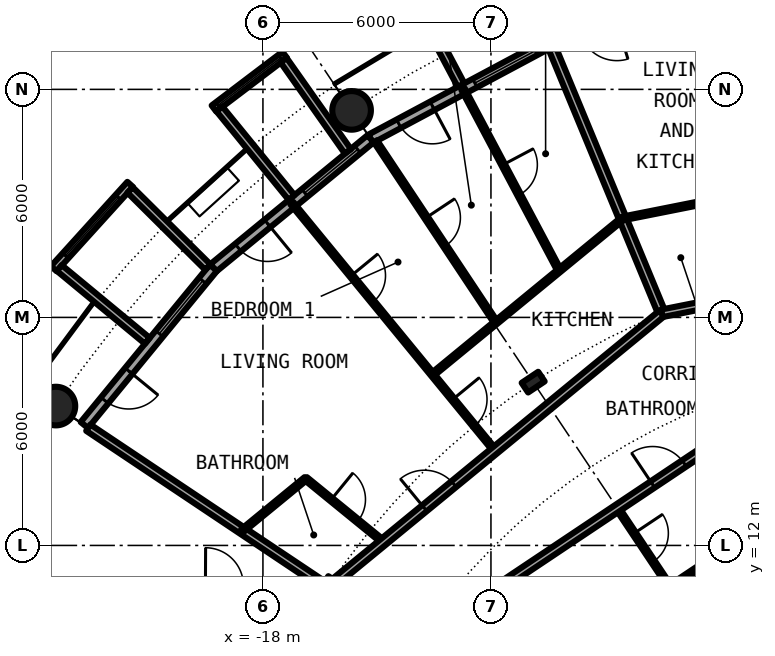
"""IFC4 building model, lengths in metres.
Left out: names, types, materials, properties, quantities, classifications, styles, units other than length and angle.
Written with IfcOpenShell. Run it as: python <this file> out.ifc"""

import sys

from ifc_helpers import new_model, si_unit, direction, frame, frame_2d, origin, origin_2d, place, context, subcontext, project, spatial, rectangle, circle, hollow_circle, i_section, extrude, element, fill, save


model = new_model("IFC4")
c1 = context("Model", 3, precision=1e-05, world=origin(), true_north=direction((0.0, 1.0)))
c2 = subcontext(c1, "Body", "Model", "MODEL_VIEW")
j1 = project(units=[si_unit("LENGTHUNIT", "METRE"), si_unit("PLANEANGLEUNIT", "RADIAN")], contexts=[c1])
p1 = place(None, origin())
s1 = spatial("IfcSite", under=j1, at=p1, CompositionType="ELEMENT")
p2 = place(p1, origin())
s2 = spatial("IfcBuilding", under=s1, at=p2, CompositionType="ELEMENT")
p3 = place(p2, frame((0.0, 0.0, 91.05)))
s3 = spatial("IfcBuildingStorey", under=s2, at=p3, CompositionType="ELEMENT", Elevation=91.05)
for number, where, z_axis, x_axis in (
    (1, (-15.667, 23.448, 0.0), (0.0, 0.0, 1.0), (1.0, 0.0, 0.0)),
    (2, (-23.448, 15.667, 0.0), (0.0, 0.0, 1.0), (1.0, 0.0, 0.0)),
):
    element("IfcColumn", number, at=place(p3, frame(where, z_axis=z_axis, x_axis=x_axis)), inside=s3, PredefinedType="COLUMN", context=c2, shape_type="SweptSolid", body=[
        extrude(hollow_circle(Radius=0.508, WallThickness=0.04, at=origin_2d()), origin(), (0.0, 0.0, 1.0), 3.05),
    ])
for number, where, z_axis, x_axis in (
    (3, (-10.889, 16.297, 0.0), (0.0, 0.0, 1.0), (-0.556, 0.831, 0.0)),
    (4, (-16.297, 10.889, 0.0), (0.0, 0.0, 1.0), (-0.831, 0.556, 0.0)),
):
    element("IfcColumn", number, at=place(p3, frame(where, z_axis=z_axis, x_axis=x_axis)), inside=s3, PredefinedType="COLUMN", context=c2, shape_type="SweptSolid", body=[
        extrude(i_section(OverallWidth=0.306, OverallDepth=0.524, WebThickness=0.021, FlangeThickness=0.04, FilletRadius=0.027, at=origin_2d()), origin(), (0.0, 0.0, 1.0), 3.05),
    ])
p4 = place(p3, frame((-10.447, 25.222, 0.0), z_axis=(0.0, 0.0, 1.0), x_axis=(-0.881915646801, -0.471407246368, 0.0)))
e5 = element("IfcWall", 5, at=p4, inside=s3, PredefinedType="SOLIDWALL", context=c2, shape_type="SweptSolid", body=[
    extrude(rectangle(XDim=5.352, YDim=0.25, at=frame_2d((2.676, 0.0))), origin(), (0.0, 0.0, 1.0), 2.7),
])
p5 = place(p4, frame((0.441, 0.0, 0.3)))
e6 = element("IfcOpeningElement", 6, at=p5, cuts=e5, PredefinedType="OPENING", context=c2, shape_type="SweptSolid", body=[
    extrude(rectangle(XDim=1.8, YDim=2.1, at=frame_2d((0.9, 1.05))), frame((0.0, 0.135, 0.0), z_axis=(0.0, -1.0, 0.0), x_axis=(1.0, 0.0, 0.0)), (0.0, 0.0, 1.0), 0.27),
])
p6 = place(p4, frame((3.51, 0.0, 0.0)))
e7 = element("IfcOpeningElement", 7, at=p6, cuts=e5, PredefinedType="OPENING", context=c2, shape_type="SweptSolid", body=[
    extrude(rectangle(XDim=1.0, YDim=2.2, at=frame_2d((0.5, 1.1))), frame((0.0, 0.135, 0.0), z_axis=(0.0, -1.0, 0.0), x_axis=(1.0, 0.0, 0.0)), (0.0, 0.0, 1.0), 0.27),
])
p7 = place(p3, frame((-12.787, 24.113, -0.03), z_axis=(0.0, 0.0, 1.0), x_axis=(-0.468365282436, 0.883534924159, 0.0)))
e8 = element("IfcWall", 8, at=p7, inside=s3, PredefinedType="SOLIDWALL", context=c2, shape_type="SweptSolid", body=[
    extrude(rectangle(XDim=3.006, YDim=0.2, at=frame_2d((1.503, 0.0))), origin(), (0.0, 0.0, 1.0), 2.73),
])
p8 = place(p3, frame((-15.167, 22.699, 0.0), z_axis=(0.0, 0.0, 1.0), x_axis=(-0.773019449054, -0.634382322723, 0.0)))
e9 = element("IfcWall", 9, at=p8, inside=s3, PredefinedType="SOLIDWALL", context=c2, shape_type="SweptSolid", body=[
    extrude(rectangle(XDim=5.352, YDim=0.25, at=frame_2d((2.676, 0.0))), origin(), (0.0, 0.0, 1.0), 2.7),
])
p9 = place(p8, frame((0.441, 0.0, 0.3)))
e10 = element("IfcOpeningElement", 10, at=p9, cuts=e9, PredefinedType="OPENING", context=c2, shape_type="SweptSolid", body=[
    extrude(rectangle(XDim=1.8, YDim=2.1, at=frame_2d((0.9, 1.05))), frame((0.0, 0.135, 0.0), z_axis=(0.0, -1.0, 0.0), x_axis=(1.0, 0.0, 0.0)), (0.0, 0.0, 1.0), 0.27),
])
p10 = place(p8, frame((3.51, 0.0, 0.0)))
e11 = element("IfcOpeningElement", 11, at=p10, cuts=e9, PredefinedType="OPENING", context=c2, shape_type="SweptSolid", body=[
    extrude(rectangle(XDim=1.0, YDim=2.2, at=frame_2d((0.5, 1.1))), frame((0.0, 0.135, 0.0), z_axis=(0.0, -1.0, 0.0), x_axis=(1.0, 0.0, 0.0)), (0.0, 0.0, 1.0), 0.27),
])
p11 = place(p3, frame((-17.427, 24.909, -0.03), z_axis=(0.0, 0.0, 1.0), x_axis=(-0.796842165306, -0.60418752353, 0.0)))
e12 = element("IfcWall", 12, at=p11, inside=s3, PredefinedType="SOLIDWALL", context=c2, shape_type="SweptSolid", body=[
    extrude(rectangle(XDim=2.337, YDim=0.2, at=frame_2d((1.168, 0.0))), origin(), (0.0, 0.0, 1.0), 2.73),
])
p12 = place(p11, frame((0.128, 0.0, 0.33)))
e13 = element("IfcOpeningElement", 13, at=p12, cuts=e12, PredefinedType="OPENING", context=c2, shape_type="SweptSolid", body=[
    extrude(circle(Radius=1.04, at=frame_2d((1.04, 1.04))), frame((0.0, 0.11, 0.0), z_axis=(0.0, -1.0, 0.0), x_axis=(1.0, 0.0, 0.0)), (0.0, 0.0, 1.0), 0.22),
])
p13 = place(p3, frame((-15.765, 22.37, -0.03), z_axis=(0.0, 0.0, 1.0), x_axis=(-0.576274612209, 0.817256123454, 0.0)))
e14 = element("IfcWall", 14, at=p13, inside=s3, PredefinedType="SOLIDWALL", context=c2, shape_type="SweptSolid", body=[
    extrude(rectangle(XDim=2.933, YDim=0.2, at=frame_2d((1.466, 0.0))), origin(), (0.0, 0.0, 1.0), 2.73),
])
p14 = place(p3, frame((-17.246, 21.155, -0.03), z_axis=(0.0, 0.0, 1.0), x_axis=(-0.631741648902, 0.775179004516, 0.0)))
e15 = element("IfcWall", 15, at=p14, inside=s3, PredefinedType="SOLIDWALL", context=c2, shape_type="SweptSolid", body=[
    extrude(rectangle(XDim=3.006, YDim=0.2, at=frame_2d((1.503, 0.0))), origin(), (0.0, 0.0, 1.0), 2.73),
])
p15 = place(p3, frame((-19.304, 19.304, 0.0), z_axis=(0.0, 0.0, 1.0), x_axis=(-0.634382322723, -0.773019449054, 0.0)))
e16 = element("IfcWall", 16, at=p15, inside=s3, PredefinedType="SOLIDWALL", context=c2, shape_type="SweptSolid", body=[
    extrude(rectangle(XDim=5.352, YDim=0.25, at=frame_2d((2.676, 0.0))), origin(), (0.0, 0.0, 1.0), 2.7),
])
p16 = place(p15, frame((0.441, 0.0, 0.3)))
e17 = element("IfcOpeningElement", 17, at=p16, cuts=e16, PredefinedType="OPENING", context=c2, shape_type="SweptSolid", body=[
    extrude(rectangle(XDim=1.8, YDim=2.1, at=frame_2d((0.9, 1.05))), frame((0.0, 0.135, 0.0), z_axis=(0.0, -1.0, 0.0), x_axis=(1.0, 0.0, 0.0)), (0.0, 0.0, 1.0), 0.27),
])
p17 = place(p15, frame((3.51, 0.0, 0.0)))
e18 = element("IfcOpeningElement", 18, at=p17, cuts=e16, PredefinedType="OPENING", context=c2, shape_type="SweptSolid", body=[
    extrude(rectangle(XDim=1.0, YDim=2.2, at=frame_2d((0.5, 1.1))), frame((0.0, 0.135, 0.0), z_axis=(0.0, -1.0, 0.0), x_axis=(1.0, 0.0, 0.0)), (0.0, 0.0, 1.0), 0.27),
])
p18 = place(p3, frame((-21.493, 21.5, -0.03), z_axis=(0.0, 0.0, 1.0), x_axis=(-0.671506829416, -0.740998365753, 0.0)))
e19 = element("IfcWall", 19, at=p18, inside=s3, PredefinedType="SOLIDWALL", context=c2, shape_type="SweptSolid", body=[
    extrude(rectangle(XDim=2.993, YDim=0.2, at=frame_2d((1.497, 0.0))), origin(), (0.0, 0.0, 1.0), 2.73),
])
p19 = place(p18, frame((0.457, 0.0, 0.33)))
e20 = element("IfcOpeningElement", 20, at=p19, cuts=e19, PredefinedType="OPENING", context=c2, shape_type="SweptSolid", body=[
    extrude(circle(Radius=1.04, at=frame_2d((1.04, 1.04))), frame((0.0, 0.11, 0.0), z_axis=(0.0, -1.0, 0.0), x_axis=(1.0, 0.0, 0.0)), (0.0, 0.0, 1.0), 0.22),
])
p20 = place(p3, frame((-19.45, 19.323, -0.03), z_axis=(0.0, 0.0, 1.0), x_axis=(-0.709727076896, 0.704476739375, 0.0)))
e21 = element("IfcWall", 21, at=p20, inside=s3, PredefinedType="SOLIDWALL", context=c2, shape_type="SweptSolid", body=[
    extrude(rectangle(XDim=2.883, YDim=0.2, at=frame_2d((1.441, 0.0))), origin(), (0.0, 0.0, 1.0), 2.73),
])
p21 = place(p3, frame((-21.041, 17.384, -0.03), z_axis=(0.0, 0.0, 1.0), x_axis=(-0.770784861449, 0.63709551667, 0.0)))
e22 = element("IfcWall", 22, at=p21, inside=s3, PredefinedType="SOLIDWALL", context=c2, shape_type="SweptSolid", body=[
    extrude(rectangle(XDim=3.006, YDim=0.2, at=frame_2d((1.503, 0.0))), origin(), (0.0, 0.0, 1.0), 2.73),
])
p22 = place(p3, frame((-22.595, 15.098, 0.0), z_axis=(0.0, 0.0, 1.0), x_axis=(0.831382022135, -0.555701298605, 0.0)))
e23 = element("IfcWall", 23, at=p22, inside=s3, PredefinedType="PARTITIONING", context=c2, shape_type="SweptSolid", body=[
    extrude(rectangle(XDim=7.313, YDim=0.2, at=frame_2d((3.657, 0.0))), origin(), (0.0, 0.0, 1.0), 2.7),
])
p23 = place(p3, frame((-17.24, 21.007, 0.0), z_axis=(0.0, 0.0, 1.0), x_axis=(0.634396151441, -0.77300810024, 0.0)))
e24 = element("IfcWall", 24, at=p23, inside=s3, PredefinedType="PARTITIONING", context=c2, shape_type="SweptSolid", body=[
    extrude(rectangle(XDim=8.419, YDim=0.1, at=frame_2d((4.209, 0.0))), origin(), (0.0, 0.0, 1.0), 2.7),
])
p24 = place(p23, frame((6.679, 0.0, 0.0)))
e25 = element("IfcOpeningElement", 25, at=p24, cuts=e24, PredefinedType="OPENING", context=c2, shape_type="SweptSolid", body=[
    extrude(rectangle(XDim=0.9, YDim=2.3, at=frame_2d((0.45, 1.15))), frame((0.0, 0.06, 0.0), z_axis=(0.0, -1.0, 0.0), x_axis=(1.0, 0.0, 0.0)), (0.0, 0.0, 1.0), 0.12),
])
p25 = place(p23, frame((2.468, 0.0, 0.0)))
e26 = element("IfcOpeningElement", 26, at=p25, cuts=e24, PredefinedType="OPENING", context=c2, shape_type="SweptSolid", body=[
    extrude(rectangle(XDim=0.9, YDim=2.3, at=frame_2d((0.45, 1.15))), frame((0.0, 0.06, 0.0), z_axis=(0.0, -1.0, 0.0), x_axis=(1.0, 0.0, 0.0)), (0.0, 0.0, 1.0), 0.12),
])
p26 = place(p3, frame((-16.874, 13.758, 0.0), z_axis=(0.0, 0.0, 1.0), x_axis=(0.774979608522, -0.631986239072, 0.0)))
e27 = element("IfcWall", 27, at=p26, inside=s3, PredefinedType="PARTITIONING", context=c2, shape_type="SweptSolid", body=[
    extrude(rectangle(XDim=2.636, YDim=0.1, at=frame_2d((1.318, 0.0))), origin(), (0.0, 0.0, 1.0), 2.7),
])
p27 = place(p26, frame((0.868, 0.0, 0.0)))
e28 = element("IfcOpeningElement", 28, at=p27, cuts=e27, PredefinedType="OPENING", context=c2, shape_type="SweptSolid", body=[
    extrude(rectangle(XDim=0.9, YDim=2.3, at=frame_2d((0.45, 1.15))), frame((0.0, 0.06, 0.0), z_axis=(0.0, -1.0, 0.0), x_axis=(1.0, 0.0, 0.0)), (0.0, 0.0, 1.0), 0.12),
])
p28 = place(p3, frame((-15.039, 22.634, 0.0), z_axis=(0.0, 0.0, 1.0), x_axis=(0.553440102418, -0.832888980018, 0.0)))
e29 = element("IfcWall", 29, at=p28, inside=s3, PredefinedType="PARTITIONING", context=c2, shape_type="SweptSolid", body=[
    extrude(rectangle(XDim=5.726, YDim=0.1, at=frame_2d((2.863, 0.0))), origin(), (0.0, 0.0, 1.0), 2.7),
])
p29 = place(p28, frame((2.413, 0.0, 0.0)))
e30 = element("IfcOpeningElement", 30, at=p29, cuts=e29, PredefinedType="OPENING", context=c2, shape_type="SweptSolid", body=[
    extrude(rectangle(XDim=0.9, YDim=2.3, at=frame_2d((0.45, 1.15))), frame((0.0, 0.06, 0.0), z_axis=(0.0, -1.0, 0.0), x_axis=(1.0, 0.0, 0.0)), (0.0, 0.0, 1.0), 0.12),
])
p30 = place(p3, frame((-12.734, 24.007, 0.0), z_axis=(0.0, 0.0, 1.0), x_axis=(0.468610030042, -0.883405139075, 0.0)))
e31 = element("IfcWall", 31, at=p30, inside=s3, PredefinedType="PARTITIONING", context=c2, shape_type="SweptSolid", body=[
    extrude(rectangle(XDim=5.403, YDim=0.1, at=frame_2d((2.702, 0.0))), origin(), (0.0, 0.0, 1.0), 2.7),
])
p31 = place(p30, frame((2.252, 0.0, 0.0)))
e32 = element("IfcOpeningElement", 32, at=p31, cuts=e31, PredefinedType="OPENING", context=c2, shape_type="SweptSolid", body=[
    extrude(rectangle(XDim=0.9, YDim=2.3, at=frame_2d((0.45, 1.15))), frame((0.0, 0.06, 0.0), z_axis=(0.0, -1.0, 0.0), x_axis=(1.0, 0.0, 0.0)), (0.0, 0.0, 1.0), 0.12),
])
p32 = place(p3, frame((-10.398, 25.106, 0.0), z_axis=(0.0, 0.0, 1.0), x_axis=(0.382490346157, -0.923959487801, 0.0)))
e33 = element("IfcWall", 33, at=p32, inside=s3, PredefinedType="PARTITIONING", context=c2, shape_type="SweptSolid", body=[
    extrude(rectangle(XDim=7.574, YDim=0.2, at=frame_2d((3.787, 0.0))), origin(), (0.0, 0.0, 1.0), 2.7),
])
p33 = place(p3, frame((-8.674, 12.982, 0.0), z_axis=(0.0, 0.0, 1.0), x_axis=(0.555355163998, -0.831613276602, 0.0)))
e34 = element("IfcWall", 34, at=p33, inside=s3, PredefinedType="PARTITIONING", context=c2, shape_type="SweptSolid", body=[
    extrude(rectangle(XDim=2.494, YDim=0.1, at=frame_2d((1.247, 0.0))), origin(), (0.0, 0.0, 1.0), 2.7),
])
p34 = place(p33, frame((0.797, 0.0, 0.0)))
e35 = element("IfcOpeningElement", 35, at=p34, cuts=e34, PredefinedType="OPENING", context=c2, shape_type="SweptSolid", body=[
    extrude(rectangle(XDim=0.9, YDim=2.3, at=frame_2d((0.45, 1.15))), frame((0.0, 0.06, 0.0), z_axis=(0.0, -1.0, 0.0), x_axis=(1.0, 0.0, 0.0)), (0.0, 0.0, 1.0), 0.12),
])
p35 = place(p3, frame((-9.695, 9.3, 0.0), z_axis=(0.0, 0.0, 1.0), x_axis=(0.831369521678, 0.555720000022, 0.0)))
e36 = element("IfcWall", 36, at=p35, inside=s3, PredefinedType="PARTITIONING", context=c2, shape_type="SweptSolid", body=[
    extrude(rectangle(XDim=4.252, YDim=0.1, at=frame_2d((2.126, 0.0))), origin(), (0.0, 0.0, 1.0), 2.7),
])
p36 = place(p3, frame((-12.708, 10.286, 0.0), z_axis=(0.0, 0.0, 1.0), x_axis=(0.831405725802, 0.555665834026, 0.0)))
e37 = element("IfcWall", 37, at=p36, inside=s3, PredefinedType="PARTITIONING", context=c2, shape_type="SweptSolid", body=[
    extrude(rectangle(XDim=11.314, YDim=0.2, at=frame_2d((5.657, 0.0))), origin(), (0.0, 0.0, 1.0), 2.7),
])
p37 = place(p36, frame((5.969, 0.0, 0.0)))
e38 = element("IfcOpeningElement", 38, at=p37, cuts=e37, PredefinedType="OPENING", context=c2, shape_type="SweptSolid", body=[
    extrude(rectangle(XDim=1.0, YDim=2.3, at=frame_2d((0.5, 1.15))), frame((0.0, 0.11, 0.0), z_axis=(0.0, -1.0, 0.0), x_axis=(1.0, 0.0, 0.0)), (0.0, 0.0, 1.0), 0.22),
])
p38 = place(p3, frame((-16.173, 10.991, 0.0), z_axis=(0.0, 0.0, 1.0), x_axis=(0.773049018445, 0.634346289562, 0.0)))
e39 = element("IfcWall", 39, at=p38, inside=s3, PredefinedType="PARTITIONING", context=c2, shape_type="SweptSolid", body=[
    extrude(rectangle(XDim=11.219, YDim=0.2, at=frame_2d((5.61, 0.0))), origin(), (0.0, 0.0, 1.0), 2.38),
])
p39 = place(p38, frame((3.135, 0.0, 0.0)))
e40 = element("IfcOpeningElement", 40, at=p39, cuts=e39, PredefinedType="OPENING", context=c2, shape_type="SweptSolid", body=[
    extrude(rectangle(XDim=1.0, YDim=2.3, at=frame_2d((0.5, 1.15))), frame((0.0, 0.11, 0.0), z_axis=(0.0, -1.0, 0.0), x_axis=(1.0, 0.0, 0.0)), (0.0, 0.0, 1.0), 0.22),
])
p40 = place(p3, frame((-7.501, 18.108, 0.0), z_axis=(0.0, 0.0, 1.0), x_axis=(0.980791233058, 0.195060393611, 0.0)))
e41 = element("IfcWall", 41, at=p40, inside=s3, PredefinedType="PARTITIONING", context=c2, shape_type="SweptSolid", body=[
    extrude(rectangle(XDim=7.65, YDim=0.2, at=frame_2d((3.825, 0.0))), origin(), (0.0, 0.0, 1.0), 2.38),
])
p41 = place(p40, frame((4.313, 0.0, 0.0)))
e42 = element("IfcOpeningElement", 42, at=p41, cuts=e41, PredefinedType="OPENING", context=c2, shape_type="SweptSolid", body=[
    extrude(rectangle(XDim=1.0, YDim=2.3, at=frame_2d((0.5, 1.15))), frame((0.0, 0.11, 0.0), z_axis=(0.0, -1.0, 0.0), x_axis=(1.0, 0.0, 0.0)), (0.0, 0.0, 1.0), 0.22),
])
p42 = place(p3, frame((-18.542, 12.389, 0.0), z_axis=(0.0, 0.0, 1.0), x_axis=(0.772948171844, 0.634469166818, 0.0)))
e43 = element("IfcWall", 43, at=p42, inside=s3, PredefinedType="PARTITIONING", context=c2, shape_type="SweptSolid", body=[
    extrude(rectangle(XDim=2.158, YDim=0.1, at=frame_2d((1.079, 0.0))), origin(), (0.0, 0.0, 1.0), 2.7),
])
p43 = place(p3, frame((-13.538, 16.496, 0.0), z_axis=(0.0, 0.0, 1.0), x_axis=(0.773000340237, 0.634405606843, 0.0)))
e44 = element("IfcWall", 44, at=p43, inside=s3, PredefinedType="PARTITIONING", context=c2, shape_type="SweptSolid", body=[
    extrude(rectangle(XDim=6.474, YDim=0.1, at=frame_2d((3.237, 0.0))), origin(), (0.0, 0.0, 1.0), 2.7),
])
p44 = place(p3, frame((-8.534, 20.603, 0.0), z_axis=(0.0, 0.0, 1.0), x_axis=(0.980821612706, 0.194907578226, 0.0)))
e45 = element("IfcWall", 45, at=p44, inside=s3, PredefinedType="PARTITIONING", context=c2, shape_type="SweptSolid", body=[
    extrude(rectangle(XDim=2.176, YDim=0.1, at=frame_2d((1.088, 0.0))), origin(), (0.0, 0.0, 1.0), 2.7),
])
p45 = place(p5, origin())
e46 = element("IfcWindow", 46, at=p45, inside=s3, PartitioningType="SINGLE_PANEL", PredefinedType="WINDOW", context=c2, shape_type="SweptSolid", body=[
    extrude(rectangle(XDim=1.8, YDim=2.1, at=frame_2d((0.9, 1.05))), frame((0.0, 0.03, 0.0), z_axis=(0.0, -1.0, 0.0), x_axis=(1.0, 0.0, 0.0)), (0.0, 0.0, 1.0), 0.06),
])
fill(e6, e46)
p46 = place(p6, origin())
e47 = element("IfcDoor", 47, at=p46, inside=s3, OperationType="SINGLE_SWING_LEFT", PredefinedType="DOOR", context=c2, shape_type="SweptSolid", body=[
    extrude(rectangle(XDim=1.0, YDim=2.2, at=frame_2d((0.5, 1.1))), frame((0.0, 0.025, 0.0), z_axis=(0.0, -1.0, 0.0), x_axis=(1.0, 0.0, 0.0)), (0.0, 0.0, 1.0), 0.05),
])
fill(e7, e47)
p47 = place(p9, origin())
e48 = element("IfcWindow", 48, at=p47, inside=s3, PartitioningType="SINGLE_PANEL", PredefinedType="WINDOW", context=c2, shape_type="SweptSolid", body=[
    extrude(rectangle(XDim=1.8, YDim=2.1, at=frame_2d((0.9, 1.05))), frame((0.0, 0.03, 0.0), z_axis=(0.0, -1.0, 0.0), x_axis=(1.0, 0.0, 0.0)), (0.0, 0.0, 1.0), 0.06),
])
fill(e10, e48)
p48 = place(p12, origin())
e49 = element("IfcWindow", 49, at=p48, inside=s3, PartitioningType="SINGLE_PANEL", PredefinedType="WINDOW", context=c2, shape_type="SweptSolid", body=[
    extrude(circle(Radius=1.04, at=frame_2d((1.04, 1.04))), frame((0.0, 0.03, 0.0), z_axis=(0.0, -1.0, 0.0), x_axis=(1.0, 0.0, 0.0)), (0.0, 0.0, 1.0), 0.06),
])
fill(e13, e49)
p49 = place(p10, origin())
e50 = element("IfcDoor", 50, at=p49, inside=s3, OperationType="SINGLE_SWING_LEFT", PredefinedType="DOOR", context=c2, shape_type="SweptSolid", body=[
    extrude(rectangle(XDim=1.0, YDim=2.2, at=frame_2d((0.5, 1.1))), frame((0.0, 0.025, 0.0), z_axis=(0.0, -1.0, 0.0), x_axis=(1.0, 0.0, 0.0)), (0.0, 0.0, 1.0), 0.05),
])
fill(e11, e50)
p50 = place(p16, origin())
e51 = element("IfcWindow", 51, at=p50, inside=s3, PartitioningType="SINGLE_PANEL", PredefinedType="WINDOW", context=c2, shape_type="SweptSolid", body=[
    extrude(rectangle(XDim=1.8, YDim=2.1, at=frame_2d((0.9, 1.05))), frame((0.0, 0.03, 0.0), z_axis=(0.0, -1.0, 0.0), x_axis=(1.0, 0.0, 0.0)), (0.0, 0.0, 1.0), 0.06),
])
fill(e17, e51)
p51 = place(p19, origin())
e52 = element("IfcWindow", 52, at=p51, inside=s3, PartitioningType="SINGLE_PANEL", PredefinedType="WINDOW", context=c2, shape_type="SweptSolid", body=[
    extrude(circle(Radius=1.04, at=frame_2d((1.04, 1.04))), frame((0.0, 0.03, 0.0), z_axis=(0.0, -1.0, 0.0), x_axis=(1.0, 0.0, 0.0)), (0.0, 0.0, 1.0), 0.06),
])
fill(e20, e52)
p52 = place(p17, origin())
e53 = element("IfcDoor", 53, at=p52, inside=s3, OperationType="SINGLE_SWING_LEFT", PredefinedType="DOOR", context=c2, shape_type="SweptSolid", body=[
    extrude(rectangle(XDim=1.0, YDim=2.2, at=frame_2d((0.5, 1.1))), frame((0.0, 0.025, 0.0), z_axis=(0.0, -1.0, 0.0), x_axis=(1.0, 0.0, 0.0)), (0.0, 0.0, 1.0), 0.05),
])
fill(e18, e53)
p53 = place(p39, origin())
e54 = element("IfcDoor", 54, at=p53, inside=s3, OperationType="SINGLE_SWING_LEFT", PredefinedType="DOOR", context=c2, shape_type="SweptSolid", body=[
    extrude(rectangle(XDim=1.0, YDim=2.3, at=frame_2d((0.5, 1.15))), frame((0.0, 0.025, 0.0), z_axis=(0.0, -1.0, 0.0), x_axis=(1.0, 0.0, 0.0)), (0.0, 0.0, 1.0), 0.05),
])
fill(e40, e54)
p54 = place(p27, origin())
e55 = element("IfcDoor", 55, at=p54, inside=s3, OperationType="SINGLE_SWING_LEFT", PredefinedType="DOOR", context=c2, shape_type="SweptSolid", body=[
    extrude(rectangle(XDim=0.9, YDim=2.3, at=frame_2d((0.45, 1.15))), frame((0.0, 0.025, 0.0), z_axis=(0.0, -1.0, 0.0), x_axis=(1.0, 0.0, 0.0)), (0.0, 0.0, 1.0), 0.05),
])
fill(e28, e55)
p55 = place(p24, origin())
e56 = element("IfcDoor", 56, at=p55, inside=s3, OperationType="SINGLE_SWING_RIGHT", PredefinedType="DOOR", context=c2, shape_type="SweptSolid", body=[
    extrude(rectangle(XDim=0.9, YDim=2.3, at=frame_2d((0.45, 1.15))), frame((0.0, 0.025, 0.0), z_axis=(0.0, -1.0, 0.0), x_axis=(1.0, 0.0, 0.0)), (0.0, 0.0, 1.0), 0.05),
])
fill(e25, e56)
p56 = place(p25, origin())
e57 = element("IfcDoor", 57, at=p56, inside=s3, OperationType="SINGLE_SWING_LEFT", PredefinedType="DOOR", context=c2, shape_type="SweptSolid", body=[
    extrude(rectangle(XDim=0.9, YDim=2.3, at=frame_2d((0.45, 1.15))), frame((0.0, 0.025, 0.0), z_axis=(0.0, -1.0, 0.0), x_axis=(1.0, 0.0, 0.0)), (0.0, 0.0, 1.0), 0.05),
])
fill(e26, e57)
p57 = place(p29, origin())
e58 = element("IfcDoor", 58, at=p57, inside=s3, OperationType="SINGLE_SWING_RIGHT", PredefinedType="DOOR", context=c2, shape_type="SweptSolid", body=[
    extrude(rectangle(XDim=0.9, YDim=2.3, at=frame_2d((0.45, 1.15))), frame((0.0, 0.025, 0.0), z_axis=(0.0, -1.0, 0.0), x_axis=(1.0, 0.0, 0.0)), (0.0, 0.0, 1.0), 0.05),
])
fill(e30, e58)
p58 = place(p31, origin())
e59 = element("IfcDoor", 59, at=p58, inside=s3, OperationType="SINGLE_SWING_LEFT", PredefinedType="DOOR", context=c2, shape_type="SweptSolid", body=[
    extrude(rectangle(XDim=0.9, YDim=2.3, at=frame_2d((0.45, 1.15))), frame((0.0, 0.025, 0.0), z_axis=(0.0, -1.0, 0.0), x_axis=(1.0, 0.0, 0.0)), (0.0, 0.0, 1.0), 0.05),
])
fill(e32, e59)
p59 = place(p37, origin())
e60 = element("IfcDoor", 60, at=p59, inside=s3, OperationType="SINGLE_SWING_RIGHT", PredefinedType="DOOR", context=c2, shape_type="SweptSolid", body=[
    extrude(rectangle(XDim=1.0, YDim=2.3, at=frame_2d((0.5, 1.15))), frame((0.0, 0.025, 0.0), z_axis=(0.0, -1.0, 0.0), x_axis=(1.0, 0.0, 0.0)), (0.0, 0.0, 1.0), 0.05),
])
fill(e38, e60)
p60 = place(p34, origin())
e61 = element("IfcDoor", 61, at=p60, inside=s3, OperationType="SINGLE_SWING_RIGHT", PredefinedType="DOOR", context=c2, shape_type="SweptSolid", body=[
    extrude(rectangle(XDim=0.9, YDim=2.3, at=frame_2d((0.45, 1.15))), frame((0.0, 0.025, 0.0), z_axis=(0.0, -1.0, 0.0), x_axis=(1.0, 0.0, 0.0)), (0.0, 0.0, 1.0), 0.05),
])
fill(e35, e61)
save(model, sys.argv[1])
